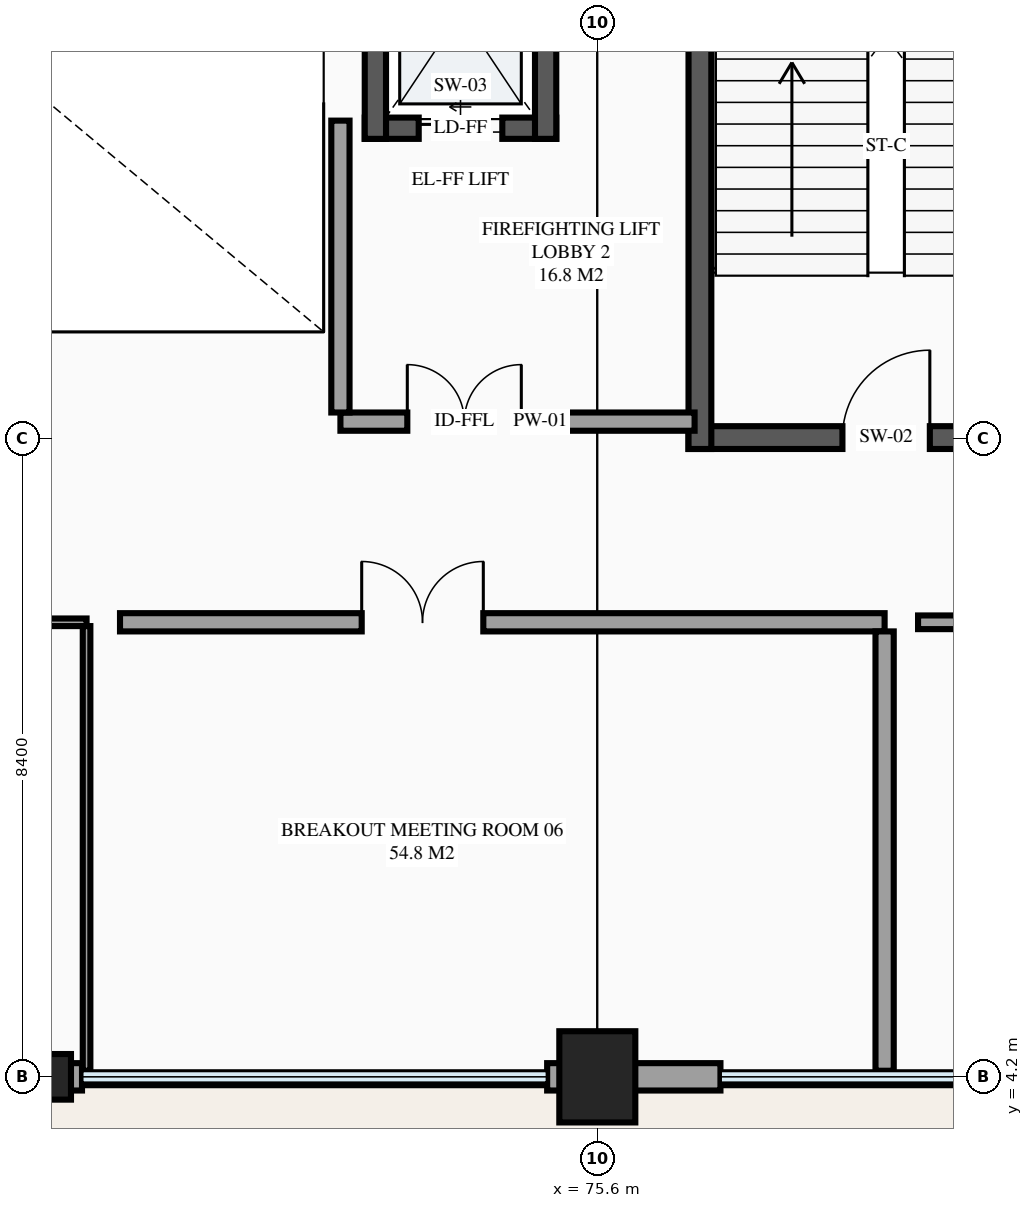
"""IFC4 building model, lengths in metres.
Left out: names, types, materials, properties, quantities, classifications, styles, units other than length and angle.
Written with IfcOpenShell. Run it as: python <this file> out.ifc"""

import sys

from ifc_helpers import new_model, si_unit, direction, frame, frame_2d, origin, origin_2d, place, context, subcontext, project, spatial, rectangle, extrude, element, fill, save


model = new_model("IFC4")
c1 = context("Model", 3, precision=1e-05, world=origin(), true_north=direction((0.0, 1.0)))
c2 = subcontext(c1, "Body", "Model", "MODEL_VIEW")
j1 = project(units=[si_unit("LENGTHUNIT", "METRE"), si_unit("PLANEANGLEUNIT", "RADIAN")], contexts=[c1])
p1 = place(None, origin())
s1 = spatial("IfcSite", under=j1, at=p1, CompositionType="ELEMENT")
p2 = place(p1, origin())
s2 = spatial("IfcBuilding", under=s1, at=p2, CompositionType="ELEMENT")
p3 = place(p2, frame((0.0, 0.0, 5.4)))
s3 = spatial("IfcBuildingStorey", under=s2, at=p3, CompositionType="ELEMENT", Elevation=5.4)
p4 = place(p3, frame((75.6, 4.2, 0.0), z_axis=(0.0, 0.0, 1.0), x_axis=(1.0, 0.0, 0.0)))
e1 = element("IfcColumn", 1, at=p4, inside=s3, PredefinedType="COLUMN", context=c2, shape_type="SweptSolid", body=[
    extrude(rectangle(XDim=1.0, YDim=1.2, at=origin_2d()), origin(), (0.0, 0.0, 1.0), 4.5),
])
p5 = place(p3, frame((68.5, 4.2, 0.0), z_axis=(0.0, 0.0, 1.0), x_axis=(1.0, 0.0, 0.0)))
e2 = element("IfcColumn", 2, at=p5, inside=s3, PredefinedType="PILASTER", context=c2, shape_type="SweptSolid", body=[
    extrude(rectangle(XDim=0.35, YDim=0.6, at=origin_2d()), origin(), (0.0, 0.0, 1.0), 4.5),
])
p6 = place(p3, frame((67.2, 4.2, 0.0), z_axis=(0.0, 0.0, 1.0), x_axis=(1.0, 0.0, 0.0)))
e3 = element("IfcWall", 3, at=p6, inside=s3, PredefinedType="STANDARD", context=c2, shape_type="SweptSolid", body=[
    extrude(rectangle(XDim=1.62, YDim=0.36, at=frame_2d((0.81, 0.0))), origin(), (0.0, 0.0, 1.0), 3.711),
])
p7 = place(p3, frame((74.94, 4.2, 0.0), z_axis=(0.0, 0.0, 1.0), x_axis=(1.0, 0.0, 0.0)))
e4 = element("IfcWall", 4, at=p7, inside=s3, PredefinedType="STANDARD", context=c2, shape_type="SweptSolid", body=[
    extrude(rectangle(XDim=0.66, YDim=0.36, at=frame_2d((0.33, 0.0))), origin(), (0.0, 0.0, 1.0), 4.5),
])
p8 = place(p3, frame((75.6, 4.2, 0.0), z_axis=(0.0, 0.0, 1.0), x_axis=(1.0, 0.0, 0.0)))
e5 = element("IfcWall", 5, at=p8, inside=s3, PredefinedType="STANDARD", context=c2, shape_type="SweptSolid", body=[
    extrude(rectangle(XDim=1.62, YDim=0.36, at=frame_2d((0.81, 0.0))), origin(), (0.0, 0.0, 1.0), 3.29),
])
p9 = place(p3, frame((72.54, 16.68, 0.0), z_axis=(0.0, 0.0, 1.0), x_axis=(1.0, 0.0, 0.0)))
e6 = element("IfcWall", 6, at=p9, inside=s3, PredefinedType="SHEAR", context=c2, shape_type="SweptSolid", body=[
    extrude(rectangle(XDim=2.52, YDim=0.28, at=frame_2d((1.26, 0.0))), origin(), (0.0, 0.0, 1.0), 4.5),
])
p10 = place(p9, frame((0.71, 0.0, 0.0)))
e7 = element("IfcOpeningElement", 7, at=p10, cuts=e6, PredefinedType="OPENING", context=c2, shape_type="SweptSolid", body=[
    extrude(rectangle(XDim=1.1, YDim=2.2, at=frame_2d((0.55, 1.1))), frame((0.0, 0.15, 0.0), z_axis=(0.0, -1.0, 0.0), x_axis=(1.0, 0.0, 0.0)), (0.0, 0.0, 1.0), 0.3),
])
for number, where, z_axis, x_axis in (
    (8, (74.92, 16.54, 0.0), (0.0, 0.0, 1.0), (0.0, 1.0, 0.0)),
    (9, (72.68, 19.86, 0.0), (0.0, 0.0, 1.0), (0.0, -1.0, 0.0)),
):
    element("IfcWall", number, at=place(p3, frame(where, z_axis=z_axis, x_axis=x_axis)), inside=s3, PredefinedType="SHEAR", context=c2, shape_type="SweptSolid", body=[
        extrude(rectangle(XDim=3.32, YDim=0.28, at=frame_2d((1.66, 0.0))), origin(), (0.0, 0.0, 1.0), 4.5),
    ])
p11 = place(p3, frame((76.8, 12.61, 0.0), z_axis=(0.0, 0.0, 1.0), x_axis=(1.0, 0.0, 0.0)))
e10 = element("IfcWall", 10, at=p11, inside=s3, PredefinedType="SHEAR", context=c2, shape_type="SweptSolid", body=[
    extrude(rectangle(XDim=5.2, YDim=0.3, at=frame_2d((2.6, 0.0))), origin(), (0.0, 0.0, 1.0), 4.5),
])
p12 = place(p11, frame((2.025, 0.0, 0.0)))
e11 = element("IfcOpeningElement", 11, at=p12, cuts=e10, PredefinedType="OPENING", context=c2, shape_type="SweptSolid", body=[
    extrude(rectangle(XDim=1.15, YDim=2.15, at=frame_2d((0.575, 1.075))), frame((0.0, 0.16, 0.0), z_axis=(0.0, -1.0, 0.0), x_axis=(1.0, 0.0, 0.0)), (0.0, 0.0, 1.0), 0.32),
])
p13 = place(p3, frame((76.95, 21.3, 0.0), z_axis=(0.0, 0.0, 1.0), x_axis=(0.0, -1.0, 0.0)))
e12 = element("IfcWall", 12, at=p13, inside=s3, PredefinedType="SHEAR", context=c2, shape_type="SweptSolid", body=[
    extrude(rectangle(XDim=8.84, YDim=0.3, at=frame_2d((4.42, 0.0))), origin(), (0.0, 0.0, 1.0), 4.5),
])
p14 = place(p3, frame((72.22, 12.82, 0.0), z_axis=(0.0, 0.0, 1.0), x_axis=(1.0, 0.0, 0.0)))
e13 = element("IfcWall", 13, at=p14, inside=s3, PredefinedType="PARTITIONING", context=c2, shape_type="SweptSolid", body=[
    extrude(rectangle(XDim=4.66, YDim=0.24, at=frame_2d((2.33, 0.0))), origin(), (0.0, 0.0, 1.0), 4.235),
])
p15 = place(p14, frame((0.88, 0.0, 0.0)))
e14 = element("IfcOpeningElement", 14, at=p15, cuts=e13, PredefinedType="OPENING", context=c2, shape_type="SweptSolid", body=[
    extrude(rectangle(XDim=1.5, YDim=2.15, at=frame_2d((0.75, 1.075))), frame((0.0, 0.13, 0.0), z_axis=(0.0, -1.0, 0.0), x_axis=(1.0, 0.0, 0.0)), (0.0, 0.0, 1.0), 0.26),
])
p16 = place(p3, frame((72.22, 12.94, 0.0), z_axis=(0.0, 0.0, 1.0), x_axis=(0.0, 1.0, 0.0)))
e15 = element("IfcWall", 15, at=p16, inside=s3, PredefinedType="PARTITIONING", context=c2, shape_type="SweptSolid", body=[
    extrude(rectangle(XDim=3.84, YDim=0.24, at=frame_2d((1.92, 0.0))), origin(), (0.0, 0.0, 1.0), 4.235),
])
p17 = place(p3, frame((58.82, 10.18, 0.0), z_axis=(0.0, 0.0, 1.0), x_axis=(1.0, 0.0, 0.0)))
e16 = element("IfcWall", 16, at=p17, inside=s3, PredefinedType="PARTITIONING", context=c2, shape_type="SweptSolid", body=[
    extrude(rectangle(XDim=10.06, YDim=0.1, at=frame_2d((5.03, 0.0))), origin(), (0.0, 0.0, 1.0), 4.235),
])
p18 = place(p17, frame((4.23, 0.0, 0.0)))
e17 = element("IfcOpeningElement", 17, at=p18, cuts=e16, PredefinedType="OPENING", context=c2, shape_type="SweptSolid", body=[
    extrude(rectangle(XDim=1.6, YDim=2.25, at=frame_2d((0.8, 1.125))), frame((0.0, 0.06, 0.0), z_axis=(0.0, -1.0, 0.0), x_axis=(1.0, 0.0, 0.0)), (0.0, 0.0, 1.0), 0.12),
])
p19 = place(p3, frame((68.88, 4.28, 0.0), z_axis=(0.0, 0.0, 1.0), x_axis=(0.0, 1.0, 0.0)))
e18 = element("IfcWall", 18, at=p19, inside=s3, PredefinedType="PARTITIONING", context=c2, shape_type="SweptSolid", body=[
    extrude(rectangle(XDim=5.85, YDim=0.1, at=frame_2d((2.925, 0.0))), origin(), (0.0, 0.0, 1.0), 4.235),
])
p20 = place(p3, frame((69.32, 10.18, 0.0), z_axis=(0.0, 0.0, 1.0), x_axis=(1.0, 0.0, 0.0)))
e19 = element("IfcWall", 19, at=p20, inside=s3, PredefinedType="PARTITIONING", context=c2, shape_type="SweptSolid", body=[
    extrude(rectangle(XDim=10.06, YDim=0.24, at=frame_2d((5.03, 0.0))), origin(), (0.0, 0.0, 1.0), 4.235),
])
p21 = place(p20, frame((3.18, 0.0, 0.0)))
e20 = element("IfcOpeningElement", 20, at=p21, cuts=e19, PredefinedType="OPENING", context=c2, shape_type="SweptSolid", body=[
    extrude(rectangle(XDim=1.6, YDim=2.25, at=frame_2d((0.8, 1.125))), frame((0.0, 0.13, 0.0), z_axis=(0.0, -1.0, 0.0), x_axis=(1.0, 0.0, 0.0)), (0.0, 0.0, 1.0), 0.26),
])
p22 = place(p3, frame((79.38, 4.28, 0.0), z_axis=(0.0, 0.0, 1.0), x_axis=(0.0, 1.0, 0.0)))
e21 = element("IfcWall", 21, at=p22, inside=s3, PredefinedType="PARTITIONING", context=c2, shape_type="SweptSolid", body=[
    extrude(rectangle(XDim=5.78, YDim=0.24, at=frame_2d((2.89, 0.0))), origin(), (0.0, 0.0, 1.0), 4.235),
])
p23 = place(p3, frame((79.82, 10.18, 0.0), z_axis=(0.0, 0.0, 1.0), x_axis=(1.0, 0.0, 0.0)))
e22 = element("IfcWall", 22, at=p23, inside=s3, PredefinedType="PARTITIONING", context=c2, shape_type="SweptSolid", body=[
    extrude(rectangle(XDim=10.06, YDim=0.18, at=frame_2d((5.03, 0.0))), origin(), (0.0, 0.0, 1.0), 4.235),
])
p24 = place(p23, frame((5.63, 0.0, 0.0)))
e23 = element("IfcOpeningElement", 23, at=p24, cuts=e22, PredefinedType="OPENING", context=c2, shape_type="SweptSolid", body=[
    extrude(rectangle(XDim=1.6, YDim=2.25, at=frame_2d((0.8, 1.125))), frame((0.0, 0.1, 0.0), z_axis=(0.0, -1.0, 0.0), x_axis=(1.0, 0.0, 0.0)), (0.0, 0.0, 1.0), 0.2),
])
p25 = place(p10, origin())
e24 = element("IfcDoor", 24, at=p25, inside=s3, OperationType="SLIDING_TO_LEFT", PredefinedType="DOOR", context=c2, shape_type="SweptSolid", body=[
    extrude(rectangle(XDim=1.1, YDim=2.2, at=frame_2d((0.55, 1.1))), frame((0.0, 0.025, 0.0), z_axis=(0.0, -1.0, 0.0), x_axis=(1.0, 0.0, 0.0)), (0.0, 0.0, 1.0), 0.05),
])
fill(e7, e24)
p26 = place(p12, origin())
e25 = element("IfcDoor", 25, at=p26, inside=s3, OperationType="SINGLE_SWING_RIGHT", PredefinedType="DOOR", context=c2, shape_type="SweptSolid", body=[
    extrude(rectangle(XDim=1.15, YDim=2.15, at=frame_2d((0.575, 1.075))), frame((0.0, 0.025, 0.0), z_axis=(0.0, -1.0, 0.0), x_axis=(1.0, 0.0, 0.0)), (0.0, 0.0, 1.0), 0.05),
])
fill(e11, e25)
p27 = place(p15, origin())
e26 = element("IfcDoor", 26, at=p27, inside=s3, OperationType="DOUBLE_DOOR_SINGLE_SWING", PredefinedType="DOOR", context=c2, shape_type="SweptSolid", body=[
    extrude(rectangle(XDim=1.5, YDim=2.15, at=frame_2d((0.75, 1.075))), frame((0.0, 0.025, 0.0), z_axis=(0.0, -1.0, 0.0), x_axis=(1.0, 0.0, 0.0)), (0.0, 0.0, 1.0), 0.05),
])
fill(e14, e26)
p28 = place(p21, origin())
e27 = element("IfcDoor", 27, at=p28, inside=s3, OperationType="DOUBLE_DOOR_SINGLE_SWING", PredefinedType="DOOR", context=c2, shape_type="SweptSolid", body=[
    extrude(rectangle(XDim=1.6, YDim=2.25, at=frame_2d((0.8, 1.125))), frame((0.0, 0.025, 0.0), z_axis=(0.0, -1.0, 0.0), x_axis=(1.0, 0.0, 0.0)), (0.0, 0.0, 1.0), 0.05),
])
fill(e20, e27)
save(model, sys.argv[1])
